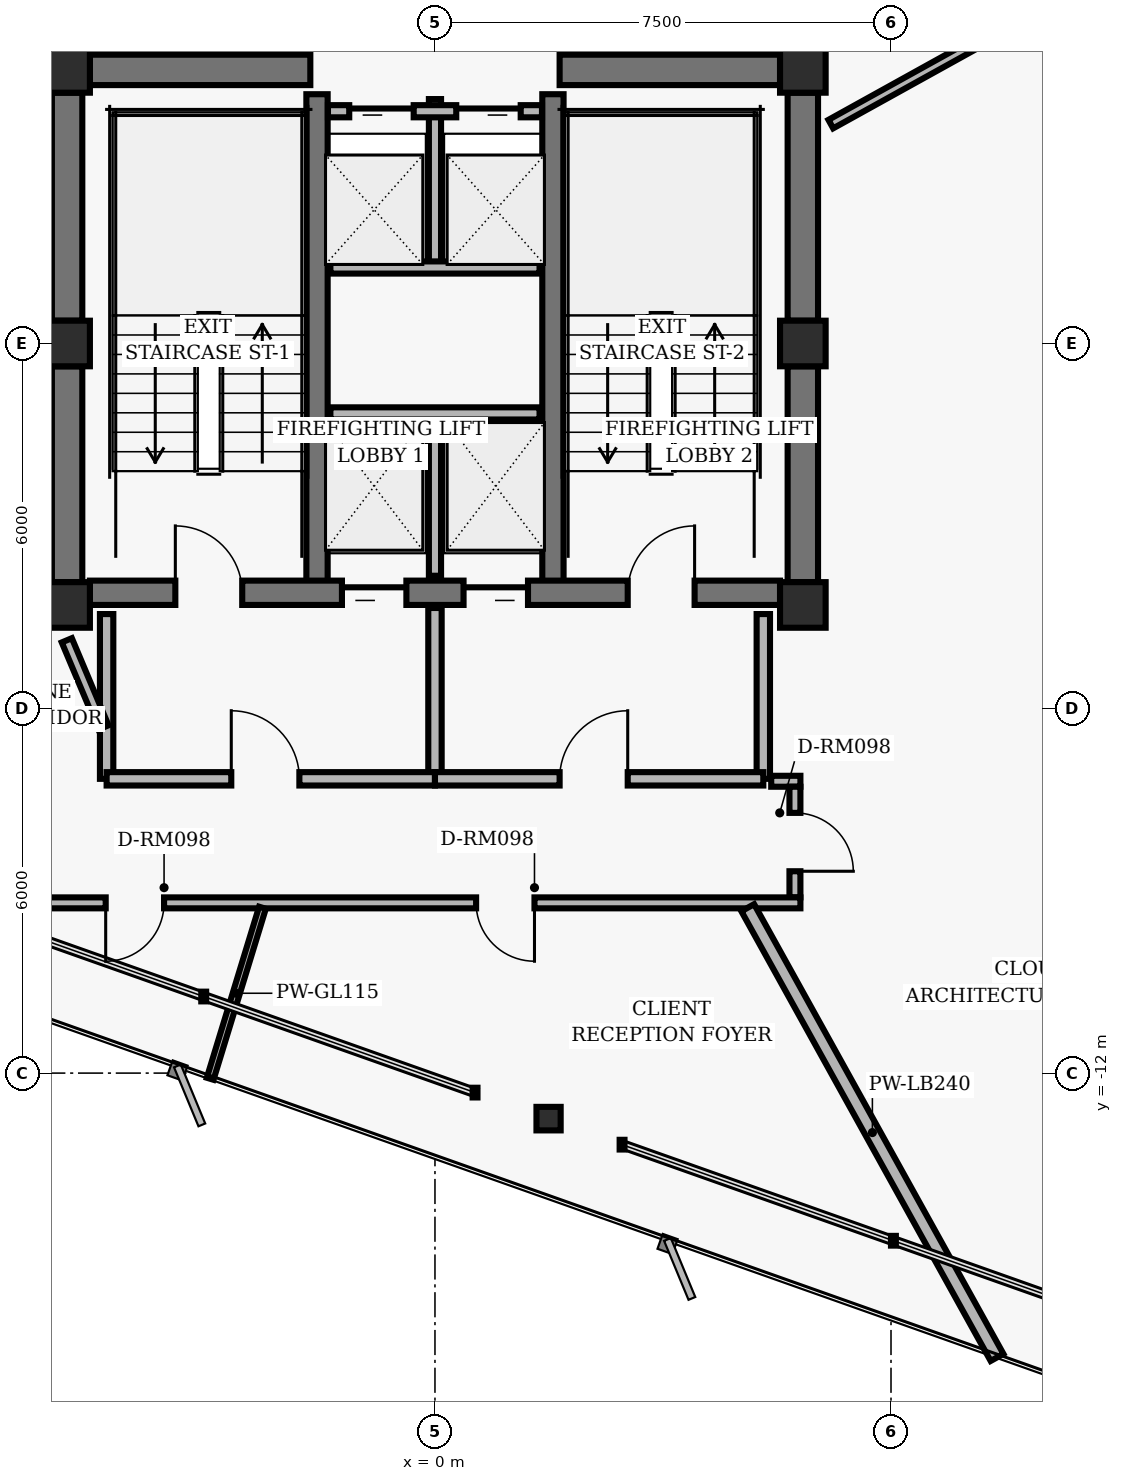
"""IFC4 building model, lengths in metres.
Left out: names, types, materials, properties, quantities, classifications, styles, units other than length and angle.
Written with IfcOpenShell. Run it as: python <this file> out.ifc"""

import sys

from ifc_helpers import new_model, si_unit, direction, frame, frame_2d, origin, origin_2d, place, context, subcontext, project, spatial, rectangle, hollow_rectangle, i_section, extrude, element, fill, save


model = new_model("IFC4")
c1 = context("Model", 3, precision=1e-05, world=origin(), true_north=direction((0.0, 1.0)))
c2 = subcontext(c1, "Body", "Model", "MODEL_VIEW")
j1 = project(units=[si_unit("LENGTHUNIT", "METRE"), si_unit("PLANEANGLEUNIT", "RADIAN")], contexts=[c1])
p1 = place(None, origin())
s1 = spatial("IfcSite", under=j1, at=p1, CompositionType="ELEMENT")
p2 = place(p1, origin())
s2 = spatial("IfcBuilding", under=s1, at=p2, CompositionType="ELEMENT")
p3 = place(p2, frame((0.0, 0.0, 178.4)))
s3 = spatial("IfcBuildingStorey", under=s2, at=p3, CompositionType="ELEMENT", Elevation=178.4)
for number, where, z_axis, x_axis in (
    (1, (-6.05, 4.5, 0.0), (0.0, 0.0, 1.0), (1.0, 0.0, 0.0)),
    (2, (6.05, 4.5, 0.0), (0.0, 0.0, 1.0), (1.0, 0.0, 0.0)),
    (3, (-6.05, 0.0, 0.0), (0.0, 0.0, 1.0), (1.0, 0.0, 0.0)),
    (4, (6.05, 0.0, 0.0), (0.0, 0.0, 1.0), (1.0, 0.0, 0.0)),
    (5, (-6.05, -4.3, 0.0), (0.0, 0.0, 1.0), (1.0, 0.0, 0.0)),
    (6, (6.05, -4.3, 0.0), (0.0, 0.0, 1.0), (1.0, 0.0, 0.0)),
):
    element("IfcColumn", number, at=place(p3, frame(where, z_axis=z_axis, x_axis=x_axis)), inside=s3, PredefinedType="COLUMN", context=c2, shape_type="SweptSolid", body=[
        extrude(hollow_rectangle(XDim=0.75, YDim=0.75, WallThickness=0.05, InnerFilletRadius=0.02, OuterFilletRadius=0.04, at=origin_2d()), origin(), (0.0, 0.0, 1.0), 3.04),
    ])
p4 = place(p3, frame((-6.05, 0.375, 0.0), z_axis=(0.0, 0.0, 1.0), x_axis=(0.0, 1.0, 0.0)))
e7 = element("IfcWall", 7, at=p4, inside=s3, PredefinedType="SHEAR", context=c2, shape_type="SweptSolid", body=[
    extrude(rectangle(XDim=3.75, YDim=0.5, at=frame_2d((1.875, 0.0))), origin(), (0.0, 0.0, 1.0), 2.798),
])
p5 = place(p3, frame((-6.05, -3.925, 0.0), z_axis=(0.0, 0.0, 1.0), x_axis=(0.0, 1.0, 0.0)))
e8 = element("IfcWall", 8, at=p5, inside=s3, PredefinedType="SHEAR", context=c2, shape_type="SweptSolid", body=[
    extrude(rectangle(XDim=3.55, YDim=0.5, at=frame_2d((1.775, 0.0))), origin(), (0.0, 0.0, 1.0), 2.798),
])
p6 = place(p3, frame((6.05, 0.375, 0.0), z_axis=(0.0, 0.0, 1.0), x_axis=(0.0, 1.0, 0.0)))
e9 = element("IfcWall", 9, at=p6, inside=s3, PredefinedType="SHEAR", context=c2, shape_type="SweptSolid", body=[
    extrude(rectangle(XDim=3.75, YDim=0.5, at=frame_2d((1.875, 0.0))), origin(), (0.0, 0.0, 1.0), 2.798),
])
p7 = place(p3, frame((6.05, -3.925, 0.0), z_axis=(0.0, 0.0, 1.0), x_axis=(0.0, 1.0, 0.0)))
e10 = element("IfcWall", 10, at=p7, inside=s3, PredefinedType="SHEAR", context=c2, shape_type="SweptSolid", body=[
    extrude(rectangle(XDim=3.55, YDim=0.5, at=frame_2d((1.775, 0.0))), origin(), (0.0, 0.0, 1.0), 2.798),
])
for number, where, z_axis, x_axis in (
    (11, (-1.94, -4.1, 0.0), (0.0, 0.0, 1.0), (0.0, 1.0, 0.0)),
    (12, (1.94, -4.1, 0.0), (0.0, 0.0, 1.0), (0.0, 1.0, 0.0)),
):
    element("IfcWall", number, at=place(p3, frame(where, z_axis=z_axis, x_axis=x_axis)), inside=s3, PredefinedType="SHEAR", context=c2, shape_type="SweptSolid", body=[
        extrude(rectangle(XDim=8.2, YDim=0.35, at=frame_2d((4.1, 0.0))), origin(), (0.0, 0.0, 1.0), 2.798),
    ])
p8 = place(p3, frame((-5.675, -4.1, 0.0), z_axis=(0.0, 0.0, 1.0), x_axis=(1.0, 0.0, 0.0)))
e13 = element("IfcWall", 13, at=p8, inside=s3, PredefinedType="SHEAR", context=c2, shape_type="SweptSolid", body=[
    extrude(rectangle(XDim=11.35, YDim=0.4, at=frame_2d((5.675, 0.0))), origin(), (0.0, 0.0, 1.0), 2.798),
])
p9 = place(p8, frame((1.405, 0.0, 0.0)))
e14 = element("IfcOpeningElement", 14, at=p9, cuts=e13, PredefinedType="OPENING", context=c2, shape_type="SweptSolid", body=[
    extrude(rectangle(XDim=1.1, YDim=2.04, at=frame_2d((0.55, 1.02))), frame((0.0, 0.21, 0.0), z_axis=(0.0, -1.0, 0.0), x_axis=(1.0, 0.0, 0.0)), (0.0, 0.0, 1.0), 0.42),
])
p10 = place(p8, frame((8.845, 0.0, 0.0)))
e15 = element("IfcOpeningElement", 15, at=p10, cuts=e13, PredefinedType="OPENING", context=c2, shape_type="SweptSolid", body=[
    extrude(rectangle(XDim=1.1, YDim=2.04, at=frame_2d((0.55, 1.02))), frame((0.0, 0.21, 0.0), z_axis=(0.0, -1.0, 0.0), x_axis=(1.0, 0.0, 0.0)), (0.0, 0.0, 1.0), 0.42),
])
p11 = place(p8, frame((4.145, 0.0, 0.0)))
e16 = element("IfcOpeningElement", 16, at=p11, cuts=e13, PredefinedType="OPENING", context=c2, shape_type="SweptSolid", body=[
    extrude(rectangle(XDim=1.06, YDim=2.04, at=frame_2d((0.53, 1.02))), frame((0.0, 0.21, 0.0), z_axis=(0.0, -1.0, 0.0), x_axis=(1.0, 0.0, 0.0)), (0.0, 0.0, 1.0), 0.42),
])
p12 = place(p8, frame((6.145, 0.0, 0.0)))
e17 = element("IfcOpeningElement", 17, at=p12, cuts=e13, PredefinedType="OPENING", context=c2, shape_type="SweptSolid", body=[
    extrude(rectangle(XDim=1.06, YDim=2.04, at=frame_2d((0.53, 1.02))), frame((0.0, 0.21, 0.0), z_axis=(0.0, -1.0, 0.0), x_axis=(1.0, 0.0, 0.0)), (0.0, 0.0, 1.0), 0.42),
])
for number, where, z_axis, x_axis in (
    (18, (-5.675, 4.5, 0.0), (0.0, 0.0, 1.0), (1.0, 0.0, 0.0)),
    (19, (2.05, 4.5, 0.0), (0.0, 0.0, 1.0), (1.0, 0.0, 0.0)),
):
    element("IfcWall", number, at=place(p3, frame(where, z_axis=z_axis, x_axis=x_axis)), inside=s3, PredefinedType="SHEAR", context=c2, shape_type="SweptSolid", body=[
        extrude(rectangle(XDim=3.625, YDim=0.5, at=frame_2d((1.812, 0.0))), origin(), (0.0, 0.0, 1.0), 2.798),
    ])
p13 = place(p3, frame((1.868, -12.749, 0.0), z_axis=(0.0, 0.0, 1.0), x_axis=(1.0, 0.0, 0.0)))
e20 = element("IfcColumn", 20, at=p13, inside=s3, PredefinedType="COLUMN", context=c2, shape_type="SweptSolid", body=[
    extrude(i_section(OverallWidth=0.398, OverallDepth=0.387, WebThickness=0.021, FlangeThickness=0.033, FilletRadius=0.018, at=origin_2d()), origin(), (0.0, 0.0, 1.0), 3.04),
])
p14 = place(p3, frame((0.0, -3.82, 0.0), z_axis=(0.0, 0.0, 1.0), x_axis=(0.0, 1.0, 0.0)))
e21 = element("IfcWall", 21, at=p14, inside=s3, PredefinedType="PARTITIONING", context=c2, shape_type="SweptSolid", body=[
    extrude(rectangle(XDim=2.67, YDim=0.2, at=frame_2d((1.335, 0.0))), origin(), (0.0, 0.0, 1.0), 2.773),
])
p15 = place(p3, frame((-1.72, -1.15, 0.0), z_axis=(0.0, 0.0, 1.0), x_axis=(1.0, 0.0, 0.0)))
e22 = element("IfcWall", 22, at=p15, inside=s3, PredefinedType="PARTITIONING", context=c2, shape_type="SweptSolid", body=[
    extrude(rectangle(XDim=3.44, YDim=0.2, at=frame_2d((1.72, 0.0))), origin(), (0.0, 0.0, 1.0), 2.773),
])
for number, where, z_axis, x_axis in (
    (23, (-5.4, -7.16, 0.0), (0.0, 0.0, 1.0), (0.0, 1.0, 0.0)),
    (24, (5.4, -7.16, 0.0), (0.0, 0.0, 1.0), (0.0, 1.0, 0.0)),
):
    element("IfcWall", number, at=place(p3, frame(where, z_axis=z_axis, x_axis=x_axis)), inside=s3, PredefinedType="PARTITIONING", context=c2, shape_type="SweptSolid", body=[
        extrude(rectangle(XDim=2.71, YDim=0.22, at=frame_2d((1.355, 0.0))), origin(), (0.0, 0.0, 1.0), 2.773),
    ])
p16 = place(p3, frame((0.0, -7.16, 0.0), z_axis=(0.0, 0.0, 1.0), x_axis=(0.0, 1.0, 0.0)))
e25 = element("IfcWall", 25, at=p16, inside=s3, PredefinedType="PARTITIONING", context=c2, shape_type="SweptSolid", body=[
    extrude(rectangle(XDim=2.81, YDim=0.22, at=frame_2d((1.405, 0.0))), origin(), (0.0, 0.0, 1.0), 2.773),
])
p17 = place(p3, frame((-5.4, -7.16, 0.0), z_axis=(0.0, 0.0, 1.0), x_axis=(1.0, 0.0, 0.0)))
e26 = element("IfcWall", 26, at=p17, inside=s3, PredefinedType="PARTITIONING", context=c2, shape_type="SweptSolid", body=[
    extrude(rectangle(XDim=5.4, YDim=0.22, at=frame_2d((2.7, 0.0))), origin(), (0.0, 0.0, 1.0), 2.395),
])
p18 = place(p17, frame((2.05, 0.0, 0.0)))
e27 = element("IfcOpeningElement", 27, at=p18, cuts=e26, PredefinedType="OPENING", context=c2, shape_type="SweptSolid", body=[
    extrude(rectangle(XDim=1.12, YDim=2.02, at=frame_2d((0.56, 1.01))), frame((0.0, 0.12, 0.0), z_axis=(0.0, -1.0, 0.0), x_axis=(1.0, 0.0, 0.0)), (0.0, 0.0, 1.0), 0.24),
])
p19 = place(p3, frame((0.0, -7.16, 0.0), z_axis=(0.0, 0.0, 1.0), x_axis=(1.0, 0.0, 0.0)))
e28 = element("IfcWall", 28, at=p19, inside=s3, PredefinedType="PARTITIONING", context=c2, shape_type="SweptSolid", body=[
    extrude(rectangle(XDim=5.4, YDim=0.22, at=frame_2d((2.7, 0.0))), origin(), (0.0, 0.0, 1.0), 2.395),
])
p20 = place(p19, frame((2.05, 0.0, 0.0)))
e29 = element("IfcOpeningElement", 29, at=p20, cuts=e28, PredefinedType="OPENING", context=c2, shape_type="SweptSolid", body=[
    extrude(rectangle(XDim=1.12, YDim=2.02, at=frame_2d((0.56, 1.01))), frame((0.0, 0.12, 0.0), z_axis=(0.0, -1.0, 0.0), x_axis=(1.0, 0.0, 0.0)), (0.0, 0.0, 1.0), 0.24),
])
p21 = place(p3, frame((0.0, 1.25, 0.0), z_axis=(0.0, 0.0, 1.0), x_axis=(0.0, 1.0, 0.0)))
e30 = element("IfcWall", 30, at=p21, inside=s3, PredefinedType="PARTITIONING", context=c2, shape_type="SweptSolid", body=[
    extrude(rectangle(XDim=2.77, YDim=0.2, at=frame_2d((1.385, 0.0))), origin(), (0.0, 0.0, 1.0), 2.773),
])
p22 = place(p3, frame((-1.72, 1.25, 0.0), z_axis=(0.0, 0.0, 1.0), x_axis=(1.0, 0.0, 0.0)))
e31 = element("IfcWall", 31, at=p22, inside=s3, PredefinedType="PARTITIONING", context=c2, shape_type="SweptSolid", body=[
    extrude(rectangle(XDim=3.44, YDim=0.2, at=frame_2d((1.72, 0.0))), origin(), (0.0, 0.0, 1.0), 2.773),
])
p23 = place(p3, frame((-1.76, 3.82, 0.0), z_axis=(0.0, 0.0, 1.0), x_axis=(1.0, 0.0, 0.0)))
e32 = element("IfcWall", 32, at=p23, inside=s3, PredefinedType="PARTITIONING", context=c2, shape_type="SweptSolid", body=[
    extrude(rectangle(XDim=3.52, YDim=0.2, at=frame_2d((1.76, 0.0))), origin(), (0.0, 0.0, 1.0), 2.773),
])
p24 = place(p23, frame((0.35, 0.0, 0.0)))
e33 = element("IfcOpeningElement", 33, at=p24, cuts=e32, PredefinedType="OPENING", context=c2, shape_type="SweptSolid", body=[
    extrude(rectangle(XDim=1.06, YDim=2.04, at=frame_2d((0.53, 1.02))), frame((0.0, 0.11, 0.0), z_axis=(0.0, -1.0, 0.0), x_axis=(1.0, 0.0, 0.0)), (0.0, 0.0, 1.0), 0.22),
])
p25 = place(p23, frame((2.11, 0.0, 0.0)))
e34 = element("IfcOpeningElement", 34, at=p25, cuts=e32, PredefinedType="OPENING", context=c2, shape_type="SweptSolid", body=[
    extrude(rectangle(XDim=1.06, YDim=2.04, at=frame_2d((0.53, 1.02))), frame((0.0, 0.11, 0.0), z_axis=(0.0, -1.0, 0.0), x_axis=(1.0, 0.0, 0.0)), (0.0, 0.0, 1.0), 0.22),
])
p26 = place(p3, frame((-6.055, -4.882, 0.0), z_axis=(0.0, 0.0, 1.0), x_axis=(0.387579540458, -0.921836265189, 0.0)))
e35 = element("IfcWall", 35, at=p26, inside=s3, PredefinedType="PARTITIONING", context=c2, shape_type="SweptSolid", body=[
    extrude(rectangle(XDim=1.555, YDim=0.18, at=frame_2d((0.777, 0.0))), origin(), (0.0, 0.0, 1.0), 2.773),
])
p27 = place(p3, frame((5.53, -7.2, 0.0), z_axis=(0.0, 0.0, 1.0), x_axis=(1.0, 0.0, 0.0)))
e36 = element("IfcWall", 36, at=p27, inside=s3, PredefinedType="PARTITIONING", context=c2, shape_type="SweptSolid", body=[
    extrude(rectangle(XDim=0.48, YDim=0.18, at=frame_2d((0.24, 0.0))), origin(), (0.0, 0.0, 1.0), 2.773),
])
p28 = place(p3, frame((5.92, -7.29, 0.0), z_axis=(0.0, 0.0, 1.0), x_axis=(0.0, -1.0, 0.0)))
e37 = element("IfcWall", 37, at=p28, inside=s3, PredefinedType="PARTITIONING", context=c2, shape_type="SweptSolid", body=[
    extrude(rectangle(XDim=1.82, YDim=0.18, at=frame_2d((0.91, 0.0))), origin(), (0.0, 0.0, 1.0), 2.773),
])
p29 = place(p28, frame((0.43, 0.0, 0.0)))
e38 = element("IfcOpeningElement", 38, at=p29, cuts=e37, PredefinedType="OPENING", context=c2, shape_type="SweptSolid", body=[
    extrude(rectangle(XDim=0.96, YDim=2.02, at=frame_2d((0.48, 1.01))), frame((0.0, 0.1, 0.0), z_axis=(0.0, -1.0, 0.0), x_axis=(1.0, 0.0, 0.0)), (0.0, 0.0, 1.0), 0.2),
])
p30 = place(p3, frame((6.01, -9.2, 0.0), z_axis=(0.0, 0.0, 1.0), x_axis=(-1.0, 0.0, 0.0)))
e39 = element("IfcWall", 39, at=p30, inside=s3, PredefinedType="PARTITIONING", context=c2, shape_type="SweptSolid", body=[
    extrude(rectangle(XDim=13.3, YDim=0.18, at=frame_2d((6.65, 0.0))), origin(), (0.0, 0.0, 1.0), 2.395),
])
p31 = place(p30, frame((10.465, 0.0, 0.0)))
e40 = element("IfcOpeningElement", 40, at=p31, cuts=e39, PredefinedType="OPENING", context=c2, shape_type="SweptSolid", body=[
    extrude(rectangle(XDim=0.96, YDim=2.02, at=frame_2d((0.48, 1.01))), frame((0.0, 0.1, 0.0), z_axis=(0.0, -1.0, 0.0), x_axis=(1.0, 0.0, 0.0)), (0.0, 0.0, 1.0), 0.2),
])
p32 = place(p30, frame((4.373, 0.0, 0.0)))
e41 = element("IfcOpeningElement", 41, at=p32, cuts=e39, PredefinedType="OPENING", context=c2, shape_type="SweptSolid", body=[
    extrude(rectangle(XDim=0.96, YDim=2.02, at=frame_2d((0.48, 1.01))), frame((0.0, 0.1, 0.0), z_axis=(0.0, -1.0, 0.0), x_axis=(1.0, 0.0, 0.0)), (0.0, 0.0, 1.0), 0.2),
])
p33 = place(p3, frame((-2.837, -9.28, 0.0), z_axis=(0.0, 0.0, 1.0), x_axis=(-0.292353462598, -0.95631033295, 0.0)))
e42 = element("IfcWall", 42, at=p33, inside=s3, PredefinedType="MOVABLE", context=c2, shape_type="SweptSolid", body=[
    extrude(rectangle(XDim=2.942, YDim=0.115, at=frame_2d((1.471, 0.0))), origin(), (0.0, 0.0, 1.0), 2.773),
])
p34 = place(p3, frame((5.144, -9.28, 0.0), z_axis=(0.0, 0.0, 1.0), x_axis=(0.484804355006, -0.874622625689, 0.0)))
e43 = element("IfcWall", 43, at=p34, inside=s3, PredefinedType="PARTITIONING", context=c2, shape_type="SweptSolid", body=[
    extrude(rectangle(XDim=8.456, YDim=0.24, at=frame_2d((4.228, 0.0))), origin(), (0.0, 0.0, 1.0), 2.773),
])
p35 = place(p3, frame((6.51, 3.609, 0.0), z_axis=(0.0, 0.0, 1.0), x_axis=(0.874634801292, 0.484782388675, 0.0)))
e44 = element("IfcWall", 44, at=p35, inside=s3, PredefinedType="PARTITIONING", context=c2, shape_type="SweptSolid", body=[
    extrude(rectangle(XDim=5.879, YDim=0.16, at=frame_2d((2.939, 0.0))), origin(), (0.0, 0.0, 1.0), 2.773),
])
p36 = place(p9, origin())
e45 = element("IfcDoor", 45, at=p36, inside=s3, OperationType="SINGLE_SWING_LEFT", PredefinedType="DOOR", context=c2, shape_type="SweptSolid", body=[
    extrude(rectangle(XDim=1.1, YDim=2.04, at=frame_2d((0.55, 1.02))), frame((0.0, 0.025, 0.0), z_axis=(0.0, -1.0, 0.0), x_axis=(1.0, 0.0, 0.0)), (0.0, 0.0, 1.0), 0.05),
])
fill(e14, e45)
p37 = place(p10, origin())
e46 = element("IfcDoor", 46, at=p37, inside=s3, OperationType="SINGLE_SWING_RIGHT", PredefinedType="DOOR", context=c2, shape_type="SweptSolid", body=[
    extrude(rectangle(XDim=1.1, YDim=2.04, at=frame_2d((0.55, 1.02))), frame((0.0, 0.025, 0.0), z_axis=(0.0, -1.0, 0.0), x_axis=(1.0, 0.0, 0.0)), (0.0, 0.0, 1.0), 0.05),
])
fill(e15, e46)
p38 = place(p11, origin())
e47 = element("IfcDoor", 47, at=p38, inside=s3, OperationType="SLIDING_TO_LEFT", PredefinedType="DOOR", context=c2, shape_type="SweptSolid", body=[
    extrude(rectangle(XDim=1.06, YDim=2.04, at=frame_2d((0.53, 1.02))), frame((0.0, 0.025, 0.0), z_axis=(0.0, -1.0, 0.0), x_axis=(1.0, 0.0, 0.0)), (0.0, 0.0, 1.0), 0.05),
])
fill(e16, e47)
p39 = place(p12, origin())
e48 = element("IfcDoor", 48, at=p39, inside=s3, OperationType="SLIDING_TO_RIGHT", PredefinedType="DOOR", context=c2, shape_type="SweptSolid", body=[
    extrude(rectangle(XDim=1.06, YDim=2.04, at=frame_2d((0.53, 1.02))), frame((0.0, 0.025, 0.0), z_axis=(0.0, -1.0, 0.0), x_axis=(1.0, 0.0, 0.0)), (0.0, 0.0, 1.0), 0.05),
])
fill(e17, e48)
p40 = place(p18, origin())
e49 = element("IfcDoor", 49, at=p40, inside=s3, OperationType="SINGLE_SWING_LEFT", PredefinedType="DOOR", context=c2, shape_type="SweptSolid", body=[
    extrude(rectangle(XDim=1.12, YDim=2.02, at=frame_2d((0.56, 1.01))), frame((0.0, 0.025, 0.0), z_axis=(0.0, -1.0, 0.0), x_axis=(1.0, 0.0, 0.0)), (0.0, 0.0, 1.0), 0.05),
])
fill(e27, e49)
p41 = place(p20, origin())
e50 = element("IfcDoor", 50, at=p41, inside=s3, OperationType="SINGLE_SWING_RIGHT", PredefinedType="DOOR", context=c2, shape_type="SweptSolid", body=[
    extrude(rectangle(XDim=1.12, YDim=2.02, at=frame_2d((0.56, 1.01))), frame((0.0, 0.025, 0.0), z_axis=(0.0, -1.0, 0.0), x_axis=(1.0, 0.0, 0.0)), (0.0, 0.0, 1.0), 0.05),
])
fill(e29, e50)
p42 = place(p24, origin())
e51 = element("IfcDoor", 51, at=p42, inside=s3, OperationType="SLIDING_TO_LEFT", PredefinedType="DOOR", context=c2, shape_type="SweptSolid", body=[
    extrude(rectangle(XDim=1.06, YDim=2.04, at=frame_2d((0.53, 1.02))), frame((0.0, 0.025, 0.0), z_axis=(0.0, -1.0, 0.0), x_axis=(1.0, 0.0, 0.0)), (0.0, 0.0, 1.0), 0.05),
])
fill(e33, e51)
p43 = place(p25, origin())
e52 = element("IfcDoor", 52, at=p43, inside=s3, OperationType="SLIDING_TO_RIGHT", PredefinedType="DOOR", context=c2, shape_type="SweptSolid", body=[
    extrude(rectangle(XDim=1.06, YDim=2.04, at=frame_2d((0.53, 1.02))), frame((0.0, 0.025, 0.0), z_axis=(0.0, -1.0, 0.0), x_axis=(1.0, 0.0, 0.0)), (0.0, 0.0, 1.0), 0.05),
])
fill(e34, e52)
p44 = place(p31, origin())
e53 = element("IfcDoor", 53, at=p44, inside=s3, OperationType="SINGLE_SWING_RIGHT", PredefinedType="DOOR", context=c2, shape_type="SweptSolid", body=[
    extrude(rectangle(XDim=0.96, YDim=2.02, at=frame_2d((0.48, 1.01))), frame((0.0, 0.025, 0.0), z_axis=(0.0, -1.0, 0.0), x_axis=(1.0, 0.0, 0.0)), (0.0, 0.0, 1.0), 0.05),
])
fill(e40, e53)
p45 = place(p32, origin())
e54 = element("IfcDoor", 54, at=p45, inside=s3, OperationType="SINGLE_SWING_LEFT", PredefinedType="DOOR", context=c2, shape_type="SweptSolid", body=[
    extrude(rectangle(XDim=0.96, YDim=2.02, at=frame_2d((0.48, 1.01))), frame((0.0, 0.025, 0.0), z_axis=(0.0, -1.0, 0.0), x_axis=(1.0, 0.0, 0.0)), (0.0, 0.0, 1.0), 0.05),
])
fill(e41, e54)
p46 = place(p29, origin())
e55 = element("IfcDoor", 55, at=p46, inside=s3, OperationType="SINGLE_SWING_RIGHT", PredefinedType="DOOR", context=c2, shape_type="SweptSolid", body=[
    extrude(rectangle(XDim=0.96, YDim=2.02, at=frame_2d((0.48, 1.01))), frame((0.0, 0.025, 0.0), z_axis=(0.0, -1.0, 0.0), x_axis=(1.0, 0.0, 0.0)), (0.0, 0.0, 1.0), 0.05),
])
fill(e38, e55)
save(model, sys.argv[1])
